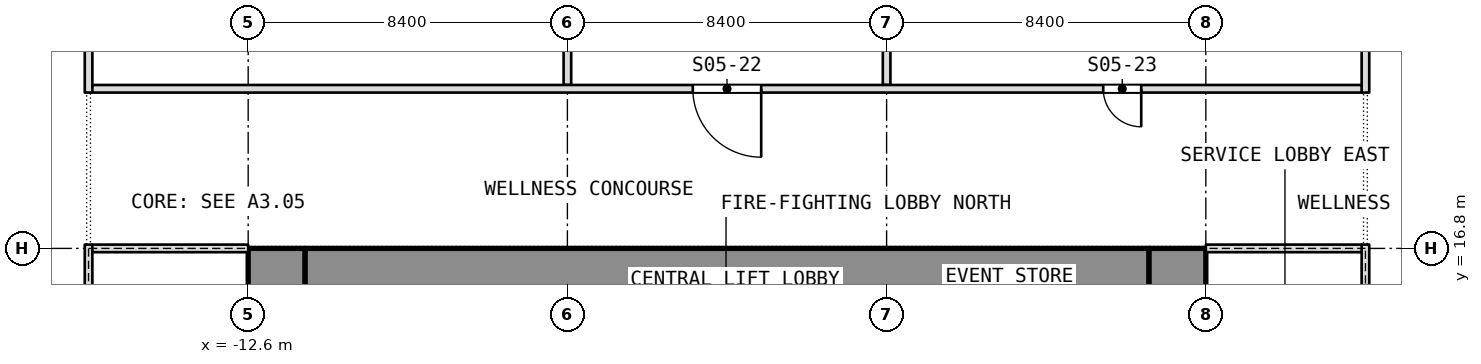
"""IFC4 building model, lengths in metres.
Left out: names, types, materials, properties, quantities, classifications, styles, units other than length and angle.
Written with IfcOpenShell. Run it as: python <this file> out.ifc"""

import sys

from ifc_helpers import new_model, si_unit, direction, frame, frame_2d, origin, place, context, subcontext, project, spatial, rectangle, extrude, element, fill, save


model = new_model("IFC4")
c1 = context("Model", 3, precision=1e-05, world=origin(), true_north=direction((0.0, 1.0)))
c2 = subcontext(c1, "Body", "Model", "MODEL_VIEW")
j1 = project(units=[si_unit("LENGTHUNIT", "METRE"), si_unit("PLANEANGLEUNIT", "RADIAN")], contexts=[c1])
p1 = place(None, origin())
s1 = spatial("IfcSite", under=j1, at=p1, CompositionType="ELEMENT")
p2 = place(p1, origin())
s2 = spatial("IfcBuilding", under=s1, at=p2, CompositionType="ELEMENT")
p3 = place(p2, frame((0.0, 0.0, 26.0)))
s3 = spatial("IfcBuildingStorey", under=s2, at=p3, CompositionType="ELEMENT", Elevation=26.0)
p4 = place(p3, frame((11.85, 0.0, 0.0), z_axis=(0.0, 0.0, 1.0), x_axis=(0.0, 1.0, 0.0)))
e1 = element("IfcWall", 1, at=p4, inside=s3, PredefinedType="SHEAR", context=c2, shape_type="SweptSolid", body=[
    extrude(rectangle(XDim=16.8, YDim=1.5, at=frame_2d((8.4, 0.0))), origin(), (0.0, 0.0, 1.0), 5.0),
])
p5 = place(p4, frame((1.688, 0.0, 0.0)))
e2 = element("IfcOpeningElement", 2, at=p5, cuts=e1, PredefinedType="OPENING", context=c2, shape_type="SweptSolid", body=[
    extrude(rectangle(XDim=0.9, YDim=2.1, at=frame_2d((0.45, 1.05))), frame((0.0, 0.75, 0.0), z_axis=(0.0, -1.0, 0.0), x_axis=(1.0, 0.0, 0.0)), (0.0, 0.0, 1.0), 1.5),
])
p6 = place(p4, frame((4.312, 0.0, 0.0)))
e3 = element("IfcOpeningElement", 3, at=p6, cuts=e1, PredefinedType="OPENING", context=c2, shape_type="SweptSolid", body=[
    extrude(rectangle(XDim=0.9, YDim=2.1, at=frame_2d((0.45, 1.05))), frame((0.0, 0.75, 0.0), z_axis=(0.0, -1.0, 0.0), x_axis=(1.0, 0.0, 0.0)), (0.0, 0.0, 1.0), 1.5),
])
p7 = place(p4, frame((6.825, 0.0, 0.0)))
e4 = element("IfcOpeningElement", 4, at=p7, cuts=e1, PredefinedType="OPENING", context=c2, shape_type="SweptSolid", body=[
    extrude(rectangle(XDim=1.2, YDim=2.1, at=frame_2d((0.6, 1.05))), frame((0.0, 0.75, 0.0), z_axis=(0.0, -1.0, 0.0), x_axis=(1.0, 0.0, 0.0)), (0.0, 0.0, 1.0), 1.5),
])
p8 = place(p4, frame((12.3, 0.0, 0.0)))
e5 = element("IfcOpeningElement", 5, at=p8, cuts=e1, PredefinedType="OPENING", context=c2, shape_type="SweptSolid", body=[
    extrude(rectangle(XDim=0.9, YDim=2.1, at=frame_2d((0.45, 1.05))), frame((0.0, 0.75, 0.0), z_axis=(0.0, -1.0, 0.0), x_axis=(1.0, 0.0, 0.0)), (0.0, 0.0, 1.0), 1.5),
])
p9 = place(p4, frame((8.775, 0.0, 0.0)))
e6 = element("IfcOpeningElement", 6, at=p9, cuts=e1, PredefinedType="OPENING", context=c2, shape_type="SweptSolid", body=[
    extrude(rectangle(XDim=1.2, YDim=2.1, at=frame_2d((0.6, 1.05))), frame((0.0, 0.75, 0.0), z_axis=(0.0, -1.0, 0.0), x_axis=(1.0, 0.0, 0.0)), (0.0, 0.0, 1.0), 1.5),
])
p10 = place(p3, frame((-11.85, 0.0, 0.0), z_axis=(0.0, 0.0, 1.0), x_axis=(0.0, 1.0, 0.0)))
e7 = element("IfcWall", 7, at=p10, inside=s3, PredefinedType="SHEAR", context=c2, shape_type="SweptSolid", body=[
    extrude(rectangle(XDim=16.8, YDim=1.5, at=frame_2d((8.4, 0.0))), origin(), (0.0, 0.0, 1.0), 5.0),
])
p11 = place(p10, frame((2.3, 0.0, 0.0)))
e8 = element("IfcOpeningElement", 8, at=p11, cuts=e7, PredefinedType="OPENING", context=c2, shape_type="SweptSolid", body=[
    extrude(rectangle(XDim=1.1, YDim=2.1, at=frame_2d((0.55, 1.05))), frame((0.0, 0.75, 0.0), z_axis=(0.0, -1.0, 0.0), x_axis=(1.0, 0.0, 0.0)), (0.0, 0.0, 1.0), 1.5),
])
p12 = place(p10, frame((4.85, 0.0, 0.0)))
e9 = element("IfcOpeningElement", 9, at=p12, cuts=e7, PredefinedType="OPENING", context=c2, shape_type="SweptSolid", body=[
    extrude(rectangle(XDim=1.1, YDim=2.1, at=frame_2d((0.55, 1.05))), frame((0.0, 0.75, 0.0), z_axis=(0.0, -1.0, 0.0), x_axis=(1.0, 0.0, 0.0)), (0.0, 0.0, 1.0), 1.5),
])
p13 = place(p10, frame((6.825, 0.0, 0.0)))
e10 = element("IfcOpeningElement", 10, at=p13, cuts=e7, PredefinedType="OPENING", context=c2, shape_type="SweptSolid", body=[
    extrude(rectangle(XDim=1.2, YDim=2.1, at=frame_2d((0.6, 1.05))), frame((0.0, 0.75, 0.0), z_axis=(0.0, -1.0, 0.0), x_axis=(1.0, 0.0, 0.0)), (0.0, 0.0, 1.0), 1.5),
])
p14 = place(p10, frame((13.4, 0.0, 0.0)))
e11 = element("IfcOpeningElement", 11, at=p14, cuts=e7, PredefinedType="OPENING", context=c2, shape_type="SweptSolid", body=[
    extrude(rectangle(XDim=1.1, YDim=2.1, at=frame_2d((0.55, 1.05))), frame((0.0, 0.75, 0.0), z_axis=(0.0, -1.0, 0.0), x_axis=(1.0, 0.0, 0.0)), (0.0, 0.0, 1.0), 1.5),
])
p15 = place(p10, frame((10.85, 0.0, 0.0)))
e12 = element("IfcOpeningElement", 12, at=p15, cuts=e7, PredefinedType="OPENING", context=c2, shape_type="SweptSolid", body=[
    extrude(rectangle(XDim=1.1, YDim=2.1, at=frame_2d((0.55, 1.05))), frame((0.0, 0.75, 0.0), z_axis=(0.0, -1.0, 0.0), x_axis=(1.0, 0.0, 0.0)), (0.0, 0.0, 1.0), 1.5),
])
p16 = place(p10, frame((8.775, 0.0, 0.0)))
e13 = element("IfcOpeningElement", 13, at=p16, cuts=e7, PredefinedType="OPENING", context=c2, shape_type="SweptSolid", body=[
    extrude(rectangle(XDim=1.2, YDim=2.1, at=frame_2d((0.6, 1.05))), frame((0.0, 0.75, 0.0), z_axis=(0.0, -1.0, 0.0), x_axis=(1.0, 0.0, 0.0)), (0.0, 0.0, 1.0), 1.5),
])
p17 = place(p3, frame((-11.1, 16.05, 0.0), z_axis=(0.0, 0.0, 1.0), x_axis=(1.0, 0.0, 0.0)))
e14 = element("IfcWall", 14, at=p17, inside=s3, PredefinedType="SHEAR", context=c2, shape_type="SweptSolid", body=[
    extrude(rectangle(XDim=22.2, YDim=1.5, at=frame_2d((11.1, 0.0))), origin(), (0.0, 0.0, 1.0), 5.0),
])
p18 = place(p3, frame((16.8, 20.9, 0.0), z_axis=(0.0, 0.0, 1.0), x_axis=(0.0, 1.0, 0.0)))
e15 = element("IfcWall", 15, at=p18, inside=s3, PredefinedType="PARTITIONING", context=c2, shape_type="SweptSolid", body=[
    extrude(rectangle(XDim=15.0, YDim=0.2, at=frame_2d((7.5, 0.0))), origin(), (0.0, 0.0, 1.0), 4.68),
])
p19 = place(p3, frame((4.2, 21.1, 0.0), z_axis=(0.0, 0.0, 1.0), x_axis=(0.0, 1.0, 0.0)))
e16 = element("IfcWall", 16, at=p19, inside=s3, PredefinedType="PARTITIONING", context=c2, shape_type="SweptSolid", body=[
    extrude(rectangle(XDim=10.78, YDim=0.2, at=frame_2d((5.39, 0.0))), origin(), (0.0, 0.0, 1.0), 4.68),
])
p20 = place(p3, frame((-4.2, 21.1, 0.0), z_axis=(0.0, 0.0, 1.0), x_axis=(0.0, 1.0, 0.0)))
e17 = element("IfcWall", 17, at=p20, inside=s3, PredefinedType="PARTITIONING", context=c2, shape_type="SweptSolid", body=[
    extrude(rectangle(XDim=10.73, YDim=0.2, at=frame_2d((5.365, 0.0))), origin(), (0.0, 0.0, 1.0), 4.68),
])
p21 = place(p3, frame((-16.8, 20.9, 0.0), z_axis=(0.0, 0.0, 1.0), x_axis=(0.0, 1.0, 0.0)))
e18 = element("IfcWall", 18, at=p21, inside=s3, PredefinedType="PARTITIONING", context=c2, shape_type="SweptSolid", body=[
    extrude(rectangle(XDim=13.8, YDim=0.2, at=frame_2d((6.9, 0.0))), origin(), (0.0, 0.0, 1.0), 4.68),
])
p22 = place(p21, frame((11.725, 0.0, 0.0)))
e19 = element("IfcOpeningElement", 19, at=p22, cuts=e18, PredefinedType="OPENING", context=c2, shape_type="SweptSolid", body=[
    extrude(rectangle(XDim=1.8, YDim=2.1, at=frame_2d((0.9, 1.05))), frame((0.0, 0.1, 0.0), z_axis=(0.0, -1.0, 0.0), x_axis=(1.0, 0.0, 0.0)), (0.0, 0.0, 1.0), 0.2),
])
p23 = place(p21, frame((1.275, 0.0, 0.0)))
e20 = element("IfcOpeningElement", 20, at=p23, cuts=e18, PredefinedType="OPENING", context=c2, shape_type="SweptSolid", body=[
    extrude(rectangle(XDim=1.8, YDim=2.1, at=frame_2d((0.9, 1.05))), frame((0.0, 0.1, 0.0), z_axis=(0.0, -1.0, 0.0), x_axis=(1.0, 0.0, 0.0)), (0.0, 0.0, 1.0), 0.2),
])
p24 = place(p3, frame((-16.7, 21.0, 0.0), z_axis=(0.0, 0.0, 1.0), x_axis=(1.0, 0.0, 0.0)))
e21 = element("IfcWall", 21, at=p24, inside=s3, PredefinedType="PARTITIONING", context=c2, shape_type="SweptSolid", body=[
    extrude(rectangle(XDim=33.4, YDim=0.2, at=frame_2d((16.7, 0.0))), origin(), (0.0, 0.0, 1.0), 4.68),
])
p25 = place(p24, frame((15.8, 0.0, 0.0)))
e22 = element("IfcOpeningElement", 22, at=p25, cuts=e21, PredefinedType="OPENING", context=c2, shape_type="SweptSolid", body=[
    extrude(rectangle(XDim=1.8, YDim=2.1, at=frame_2d((0.9, 1.05))), frame((0.0, 0.1, 0.0), z_axis=(0.0, -1.0, 0.0), x_axis=(1.0, 0.0, 0.0)), (0.0, 0.0, 1.0), 0.2),
])
p26 = place(p24, frame((26.6, 0.0, 0.0)))
e23 = element("IfcOpeningElement", 23, at=p26, cuts=e21, PredefinedType="OPENING", context=c2, shape_type="SweptSolid", body=[
    extrude(rectangle(XDim=1.0, YDim=2.1, at=frame_2d((0.5, 1.05))), frame((0.0, 0.1, 0.0), z_axis=(0.0, -1.0, 0.0), x_axis=(1.0, 0.0, 0.0)), (0.0, 0.0, 1.0), 0.2),
])
p27 = place(p3, frame((-16.8, -0.1, 0.0), z_axis=(0.0, 0.0, 1.0), x_axis=(0.0, 1.0, 0.0)))
e24 = element("IfcWall", 24, at=p27, inside=s3, PredefinedType="PARTITIONING", context=c2, shape_type="SweptSolid", body=[
    extrude(rectangle(XDim=17.0, YDim=0.2, at=frame_2d((8.5, 0.0))), origin(), (0.0, 0.0, 1.0), 4.8),
])
p28 = place(p27, frame((1.9, 0.0, 0.0)))
e25 = element("IfcOpeningElement", 25, at=p28, cuts=e24, PredefinedType="OPENING", context=c2, shape_type="SweptSolid", body=[
    extrude(rectangle(XDim=2.4, YDim=2.1, at=frame_2d((1.2, 1.05))), frame((0.0, 0.1, 0.0), z_axis=(0.0, -1.0, 0.0), x_axis=(1.0, 0.0, 0.0)), (0.0, 0.0, 1.0), 0.2),
])
p29 = place(p27, frame((12.7, 0.0, 0.0)))
e26 = element("IfcOpeningElement", 26, at=p29, cuts=e24, PredefinedType="OPENING", context=c2, shape_type="SweptSolid", body=[
    extrude(rectangle(XDim=2.4, YDim=2.1, at=frame_2d((1.2, 1.05))), frame((0.0, 0.1, 0.0), z_axis=(0.0, -1.0, 0.0), x_axis=(1.0, 0.0, 0.0)), (0.0, 0.0, 1.0), 0.2),
])
p30 = place(p3, frame((-16.7, 16.8, 0.0), z_axis=(0.0, 0.0, 1.0), x_axis=(1.0, 0.0, 0.0)))
e27 = element("IfcWall", 27, at=p30, inside=s3, PredefinedType="PARTITIONING", context=c2, shape_type="SweptSolid", body=[
    extrude(rectangle(XDim=4.1, YDim=0.2, at=frame_2d((2.05, 0.0))), origin(), (0.0, 0.0, 1.0), 4.8),
])
p31 = place(p3, frame((16.8, -0.1, 0.0), z_axis=(0.0, 0.0, 1.0), x_axis=(0.0, 1.0, 0.0)))
e28 = element("IfcWall", 28, at=p31, inside=s3, PredefinedType="PARTITIONING", context=c2, shape_type="SweptSolid", body=[
    extrude(rectangle(XDim=17.0, YDim=0.2, at=frame_2d((8.5, 0.0))), origin(), (0.0, 0.0, 1.0), 4.8),
])
p32 = place(p31, frame((1.9, 0.0, 0.0)))
e29 = element("IfcOpeningElement", 29, at=p32, cuts=e28, PredefinedType="OPENING", context=c2, shape_type="SweptSolid", body=[
    extrude(rectangle(XDim=2.4, YDim=2.1, at=frame_2d((1.2, 1.05))), frame((0.0, 0.1, 0.0), z_axis=(0.0, -1.0, 0.0), x_axis=(1.0, 0.0, 0.0)), (0.0, 0.0, 1.0), 0.2),
])
p33 = place(p31, frame((12.7, 0.0, 0.0)))
e30 = element("IfcOpeningElement", 30, at=p33, cuts=e28, PredefinedType="OPENING", context=c2, shape_type="SweptSolid", body=[
    extrude(rectangle(XDim=2.4, YDim=2.1, at=frame_2d((1.2, 1.05))), frame((0.0, 0.1, 0.0), z_axis=(0.0, -1.0, 0.0), x_axis=(1.0, 0.0, 0.0)), (0.0, 0.0, 1.0), 0.2),
])
p34 = place(p3, frame((12.6, 16.8, 0.0), z_axis=(0.0, 0.0, 1.0), x_axis=(1.0, 0.0, 0.0)))
e31 = element("IfcWall", 31, at=p34, inside=s3, PredefinedType="PARTITIONING", context=c2, shape_type="SweptSolid", body=[
    extrude(rectangle(XDim=4.1, YDim=0.2, at=frame_2d((2.05, 0.0))), origin(), (0.0, 0.0, 1.0), 4.8),
])
p35 = place(p25, origin())
e32 = element("IfcDoor", 32, at=p35, inside=s3, OperationType="DOUBLE_DOOR_SINGLE_SWING", PredefinedType="DOOR", context=c2, shape_type="SweptSolid", body=[
    extrude(rectangle(XDim=1.8, YDim=2.1, at=frame_2d((0.9, 1.05))), frame((0.0, 0.025, 0.0), z_axis=(0.0, -1.0, 0.0), x_axis=(1.0, 0.0, 0.0)), (0.0, 0.0, 1.0), 0.05),
])
fill(e22, e32)
p36 = place(p26, origin())
e33 = element("IfcDoor", 33, at=p36, inside=s3, OperationType="SINGLE_SWING_RIGHT", PredefinedType="DOOR", context=c2, shape_type="SweptSolid", body=[
    extrude(rectangle(XDim=1.0, YDim=2.1, at=frame_2d((0.5, 1.05))), frame((0.0, 0.025, 0.0), z_axis=(0.0, -1.0, 0.0), x_axis=(1.0, 0.0, 0.0)), (0.0, 0.0, 1.0), 0.05),
])
fill(e23, e33)
save(model, sys.argv[1])
